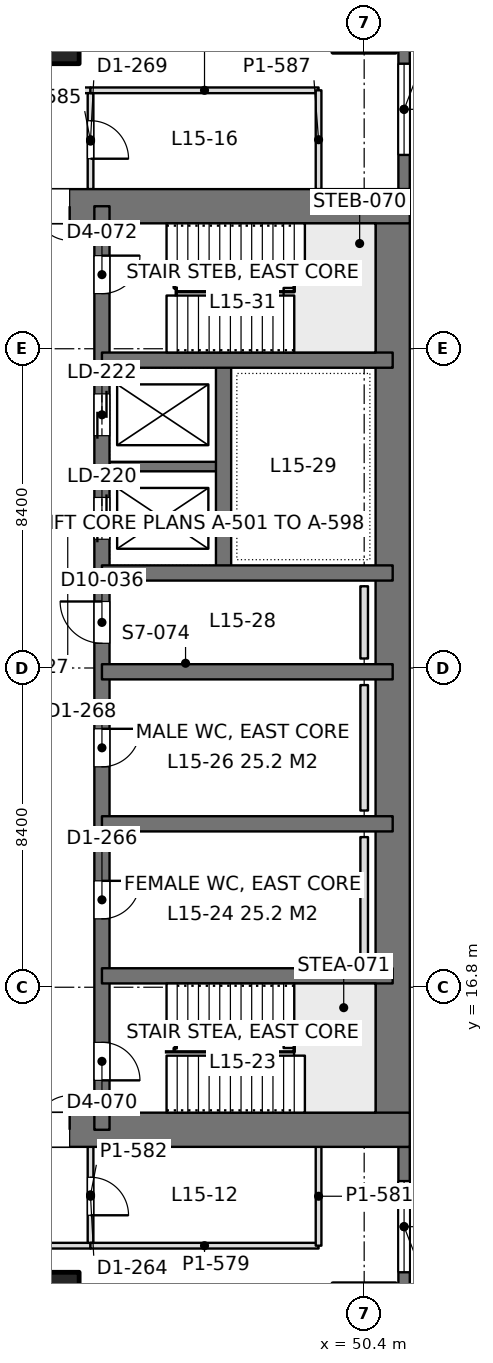
"""IFC4 building model, lengths in metres.
Left out: names, types, materials, properties, quantities, classifications, styles, units other than length and angle.
Written with IfcOpenShell. Run it as: python <this file> out.ifc"""

import sys

from ifc_helpers import new_model, si_unit, direction, frame, frame_2d, origin, origin_2d, place, context, subcontext, project, spatial, rectangle, extrude, element, fill, save


model = new_model("IFC4")
c1 = context("Model", 3, precision=1e-05, world=origin(), true_north=direction((0.0, 1.0)))
c2 = subcontext(c1, "Body", "Model", "MODEL_VIEW")
j1 = project(units=[si_unit("LENGTHUNIT", "METRE"), si_unit("PLANEANGLEUNIT", "RADIAN")], contexts=[c1])
p1 = place(None, origin())
s1 = spatial("IfcSite", under=j1, at=p1, CompositionType="ELEMENT")
p2 = place(p1, origin())
s2 = spatial("IfcBuilding", under=s1, at=p2, CompositionType="ELEMENT")
p3 = place(p2, frame((0.0, 0.0, 68.4)))
s3 = spatial("IfcBuildingStorey", under=s2, at=p3, CompositionType="ELEMENT", Elevation=68.4)
for number, where, z_axis, x_axis in (
    (1, (42.0, 8.4, 0.0), (0.0, 0.0, 1.0), (1.0, 0.0, 0.0)),
    (2, (42.0, 42.0, 0.0), (0.0, 0.0, 1.0), (1.0, 0.0, 0.0)),
):
    element("IfcColumn", number, at=place(p3, frame(where, z_axis=z_axis, x_axis=x_axis)), inside=s3, PredefinedType="COLUMN", context=c2, shape_type="SweptSolid", body=[
        extrude(rectangle(XDim=1.8, YDim=1.8, at=origin_2d()), origin(), (0.0, 0.0, 1.0), 4.5),
    ])
p4 = place(p3, frame((33.6, 13.05, 0.0), z_axis=(0.0, 0.0, 1.0), x_axis=(1.0, 0.0, 0.0)))
e3 = element("IfcWall", 3, at=p4, inside=s3, PredefinedType="SHEAR", context=c2, shape_type="SweptSolid", body=[
    extrude(rectangle(XDim=18.0, YDim=0.9, at=frame_2d((9.0, 0.0))), origin(), (0.0, 0.0, 1.0), 4.5),
])
p5 = place(p4, frame((7.25, 0.0, 0.0)))
e4 = element("IfcOpeningElement", 4, at=p5, cuts=e3, PredefinedType="OPENING", context=c2, shape_type="SweptSolid", body=[
    extrude(rectangle(XDim=1.8, YDim=2.4, at=frame_2d((0.9, 1.2))), frame((0.0, 0.46, 0.0), z_axis=(0.0, -1.0, 0.0), x_axis=(1.0, 0.0, 0.0)), (0.0, 0.0, 1.0), 0.92),
])
p6 = place(p3, frame((33.6, 37.35, 0.0), z_axis=(0.0, 0.0, 1.0), x_axis=(1.0, 0.0, 0.0)))
e5 = element("IfcWall", 5, at=p6, inside=s3, PredefinedType="SHEAR", context=c2, shape_type="SweptSolid", body=[
    extrude(rectangle(XDim=18.0, YDim=0.9, at=frame_2d((9.0, 0.0))), origin(), (0.0, 0.0, 1.0), 4.5),
])
p7 = place(p6, frame((7.25, 0.0, 0.0)))
e6 = element("IfcOpeningElement", 6, at=p7, cuts=e5, PredefinedType="OPENING", context=c2, shape_type="SweptSolid", body=[
    extrude(rectangle(XDim=1.8, YDim=2.4, at=frame_2d((0.9, 1.2))), frame((0.0, 0.46, 0.0), z_axis=(0.0, -1.0, 0.0), x_axis=(1.0, 0.0, 0.0)), (0.0, 0.0, 1.0), 0.92),
])
p8 = place(p3, frame((51.15, 13.05, 0.0), z_axis=(0.0, 0.0, 1.0), x_axis=(0.0, 1.0, 0.0)))
e7 = element("IfcWall", 7, at=p8, inside=s3, PredefinedType="SHEAR", context=c2, shape_type="SweptSolid", body=[
    extrude(rectangle(XDim=24.3, YDim=0.9, at=frame_2d((12.15, 0.0))), origin(), (0.0, 0.0, 1.0), 4.5),
])
p9 = place(p3, frame((43.5, 13.05, 0.0), z_axis=(0.0, 0.0, 1.0), x_axis=(0.0, 1.0, 0.0)))
e8 = element("IfcWall", 8, at=p9, inside=s3, PredefinedType="SHEAR", context=c2, shape_type="SweptSolid", body=[
    extrude(rectangle(XDim=24.3, YDim=0.4, at=frame_2d((12.15, 0.0))), origin(), (0.0, 0.0, 1.0), 4.5),
])
p10 = place(p9, frame((1.3, 0.0, 0.0)))
e9 = element("IfcOpeningElement", 9, at=p10, cuts=e8, PredefinedType="OPENING", context=c2, shape_type="SweptSolid", body=[
    extrude(rectangle(XDim=1.0, YDim=2.2, at=frame_2d((0.5, 1.1))), frame((0.0, 0.21, 0.0), z_axis=(0.0, -1.0, 0.0), x_axis=(1.0, 0.0, 0.0)), (0.0, 0.0, 1.0), 0.42),
])
p11 = place(p9, frame((22.0, 0.0, 0.0)))
e10 = element("IfcOpeningElement", 10, at=p11, cuts=e8, PredefinedType="OPENING", context=c2, shape_type="SweptSolid", body=[
    extrude(rectangle(XDim=1.0, YDim=2.2, at=frame_2d((0.5, 1.1))), frame((0.0, 0.21, 0.0), z_axis=(0.0, -1.0, 0.0), x_axis=(1.0, 0.0, 0.0)), (0.0, 0.0, 1.0), 0.42),
])
p12 = place(p9, frame((5.55, 0.0, 0.0)))
e11 = element("IfcOpeningElement", 11, at=p12, cuts=e8, PredefinedType="OPENING", context=c2, shape_type="SweptSolid", body=[
    extrude(rectangle(XDim=1.0, YDim=2.2, at=frame_2d((0.5, 1.1))), frame((0.0, 0.21, 0.0), z_axis=(0.0, -1.0, 0.0), x_axis=(1.0, 0.0, 0.0)), (0.0, 0.0, 1.0), 0.42),
])
p13 = place(p9, frame((9.55, 0.0, 0.0)))
e12 = element("IfcOpeningElement", 12, at=p13, cuts=e8, PredefinedType="OPENING", context=c2, shape_type="SweptSolid", body=[
    extrude(rectangle(XDim=1.0, YDim=2.2, at=frame_2d((0.5, 1.1))), frame((0.0, 0.21, 0.0), z_axis=(0.0, -1.0, 0.0), x_axis=(1.0, 0.0, 0.0)), (0.0, 0.0, 1.0), 0.42),
])
p14 = place(p9, frame((12.8, 0.0, 0.0)))
e13 = element("IfcOpeningElement", 13, at=p14, cuts=e8, PredefinedType="OPENING", context=c2, shape_type="SweptSolid", body=[
    extrude(rectangle(XDim=1.1, YDim=2.2, at=frame_2d((0.55, 1.1))), frame((0.0, 0.21, 0.0), z_axis=(0.0, -1.0, 0.0), x_axis=(1.0, 0.0, 0.0)), (0.0, 0.0, 1.0), 0.42),
])
p15 = place(p9, frame((15.538, 0.0, 0.0)))
e14 = element("IfcOpeningElement", 14, at=p15, cuts=e8, PredefinedType="OPENING", context=c2, shape_type="SweptSolid", body=[
    extrude(rectangle(XDim=1.1, YDim=2.2, at=frame_2d((0.55, 1.1))), frame((0.0, 0.21, 0.0), z_axis=(0.0, -1.0, 0.0), x_axis=(1.0, 0.0, 0.0)), (0.0, 0.0, 1.0), 0.42),
])
p16 = place(p9, frame((18.262, 0.0, 0.0)))
e15 = element("IfcOpeningElement", 15, at=p16, cuts=e8, PredefinedType="OPENING", context=c2, shape_type="SweptSolid", body=[
    extrude(rectangle(XDim=1.1, YDim=2.2, at=frame_2d((0.55, 1.1))), frame((0.0, 0.21, 0.0), z_axis=(0.0, -1.0, 0.0), x_axis=(1.0, 0.0, 0.0)), (0.0, 0.0, 1.0), 0.42),
])
for number, where, z_axis, x_axis in (
    (16, (51.15, 17.1, 0.0), (0.0, 0.0, 1.0), (-1.0, 0.0, 0.0)),
    (17, (51.15, 21.1, 0.0), (0.0, 0.0, 1.0), (-1.0, 0.0, 0.0)),
    (18, (51.15, 25.1, 0.0), (0.0, 0.0, 1.0), (-1.0, 0.0, 0.0)),
    (19, (51.15, 27.7, 0.0), (0.0, 0.0, 1.0), (-1.0, 0.0, 0.0)),
    (20, (51.15, 33.3, 0.0), (0.0, 0.0, 1.0), (-1.0, 0.0, 0.0)),
):
    element("IfcWall", number, at=place(p3, frame(where, z_axis=z_axis, x_axis=x_axis)), inside=s3, PredefinedType="SHEAR", context=c2, shape_type="SweptSolid", body=[
        extrude(rectangle(XDim=7.65, YDim=0.4, at=frame_2d((3.825, 0.0))), origin(), (0.0, 0.0, 1.0), 4.5),
    ])
p17 = place(p3, frame((46.7, 27.7, 0.0), z_axis=(0.0, 0.0, 1.0), x_axis=(0.0, 1.0, 0.0)))
e21 = element("IfcWall", 21, at=p17, inside=s3, PredefinedType="SHEAR", context=c2, shape_type="SweptSolid", body=[
    extrude(rectangle(XDim=5.6, YDim=0.4, at=frame_2d((2.8, 0.0))), origin(), (0.0, 0.0, 1.0), 4.5),
])
p18 = place(p3, frame((46.7, 30.5, 0.0), z_axis=(0.0, 0.0, 1.0), x_axis=(-1.0, 0.0, 0.0)))
e22 = element("IfcWall", 22, at=p18, inside=s3, PredefinedType="SHEAR", context=c2, shape_type="SweptSolid", body=[
    extrude(rectangle(XDim=3.2, YDim=0.25, at=frame_2d((1.6, 0.0))), origin(), (0.0, 0.0, 1.0), 4.5),
])
p19 = place(p3, frame((51.45, 42.0, 0.0), z_axis=(0.0, 0.0, 1.0), x_axis=(0.0, -1.0, 0.0)))
e23 = element("IfcWall", 23, at=p19, inside=s3, PredefinedType="SOLIDWALL", context=c2, shape_type="SweptSolid", body=[
    extrude(rectangle(XDim=4.2, YDim=0.3, at=frame_2d((2.1, 0.0))), origin(), (0.0, 0.0, 1.0), 4.34),
])
p20 = place(p19, frame((0.9, 0.0, 0.9)))
e24 = element("IfcOpeningElement", 24, at=p20, cuts=e23, PredefinedType="OPENING", context=c2, shape_type="SweptSolid", body=[
    extrude(rectangle(XDim=2.4, YDim=1.9, at=frame_2d((1.2, 0.95))), frame((0.0, 0.16, 0.0), z_axis=(0.0, -1.0, 0.0), x_axis=(1.0, 0.0, 0.0)), (0.0, 0.0, 1.0), 0.32),
])
p21 = place(p3, frame((51.45, 12.6, 0.0), z_axis=(0.0, 0.0, 1.0), x_axis=(0.0, -1.0, 0.0)))
e25 = element("IfcWall", 25, at=p21, inside=s3, PredefinedType="SOLIDWALL", context=c2, shape_type="SweptSolid", body=[
    extrude(rectangle(XDim=4.2, YDim=0.3, at=frame_2d((2.1, 0.0))), origin(), (0.0, 0.0, 1.0), 4.34),
])
p22 = place(p21, frame((0.9, 0.0, 0.9)))
e26 = element("IfcOpeningElement", 26, at=p22, cuts=e25, PredefinedType="OPENING", context=c2, shape_type="SweptSolid", body=[
    extrude(rectangle(XDim=2.4, YDim=1.9, at=frame_2d((1.2, 0.95))), frame((0.0, 0.16, 0.0), z_axis=(0.0, -1.0, 0.0), x_axis=(1.0, 0.0, 0.0)), (0.0, 0.0, 1.0), 0.32),
])
p23 = place(p3, frame((1.2, 10.0, 0.0), z_axis=(0.0, 0.0, 1.0), x_axis=(1.0, 0.0, 0.0)))
e27 = element("IfcWall", 27, at=p23, inside=s3, PredefinedType="PARTITIONING", context=c2, shape_type="SweptSolid", body=[
    extrude(rectangle(XDim=42.002, YDim=0.15, at=frame_2d((21.001, 0.0))), origin(), (0.0, 0.0, 1.0), 3.74),
])
p24 = place(p23, frame((2.1, 0.0, 0.0)))
e28 = element("IfcOpeningElement", 28, at=p24, cuts=e27, PredefinedType="OPENING", context=c2, shape_type="SweptSolid", body=[
    extrude(rectangle(XDim=1.8, YDim=2.2, at=frame_2d((0.9, 1.1))), frame((0.0, 0.085, 0.0), z_axis=(0.0, -1.0, 0.0), x_axis=(1.0, 0.0, 0.0)), (0.0, 0.0, 1.0), 0.17),
])
p25 = place(p23, frame((10.5, 0.0, 0.0)))
e29 = element("IfcOpeningElement", 29, at=p25, cuts=e27, PredefinedType="OPENING", context=c2, shape_type="SweptSolid", body=[
    extrude(rectangle(XDim=1.8, YDim=2.2, at=frame_2d((0.9, 1.1))), frame((0.0, 0.085, 0.0), z_axis=(0.0, -1.0, 0.0), x_axis=(1.0, 0.0, 0.0)), (0.0, 0.0, 1.0), 0.17),
])
p26 = place(p23, frame((18.9, 0.0, 0.0)))
e30 = element("IfcOpeningElement", 30, at=p26, cuts=e27, PredefinedType="OPENING", context=c2, shape_type="SweptSolid", body=[
    extrude(rectangle(XDim=1.8, YDim=2.2, at=frame_2d((0.9, 1.1))), frame((0.0, 0.085, 0.0), z_axis=(0.0, -1.0, 0.0), x_axis=(1.0, 0.0, 0.0)), (0.0, 0.0, 1.0), 0.17),
])
p27 = place(p23, frame((27.3, 0.0, 0.0)))
e31 = element("IfcOpeningElement", 31, at=p27, cuts=e27, PredefinedType="OPENING", context=c2, shape_type="SweptSolid", body=[
    extrude(rectangle(XDim=1.8, YDim=2.2, at=frame_2d((0.9, 1.1))), frame((0.0, 0.085, 0.0), z_axis=(0.0, -1.0, 0.0), x_axis=(1.0, 0.0, 0.0)), (0.0, 0.0, 1.0), 0.17),
])
p28 = place(p23, frame((35.7, 0.0, 0.0)))
e32 = element("IfcOpeningElement", 32, at=p28, cuts=e27, PredefinedType="OPENING", context=c2, shape_type="SweptSolid", body=[
    extrude(rectangle(XDim=1.8, YDim=2.2, at=frame_2d((0.9, 1.1))), frame((0.0, 0.085, 0.0), z_axis=(0.0, -1.0, 0.0), x_axis=(1.0, 0.0, 0.0)), (0.0, 0.0, 1.0), 0.17),
])
p29 = place(p3, frame((43.2, 10.074, 0.0), z_axis=(0.0, 0.0, 1.0), x_axis=(0.0, 1.0, 0.0)))
e33 = element("IfcWall", 33, at=p29, inside=s3, PredefinedType="PARTITIONING", context=c2, shape_type="SweptSolid", body=[
    extrude(rectangle(XDim=2.528, YDim=0.15, at=frame_2d((1.264, 0.0))), origin(), (0.0, 0.0, 1.0), 4.34),
])
p30 = place(p29, frame((0.726, 0.0, 0.0)))
e34 = element("IfcOpeningElement", 34, at=p30, cuts=e33, PredefinedType="OPENING", context=c2, shape_type="SweptSolid", body=[
    extrude(rectangle(XDim=1.0, YDim=2.2, at=frame_2d((0.5, 1.1))), frame((0.0, 0.085, 0.0), z_axis=(0.0, -1.0, 0.0), x_axis=(1.0, 0.0, 0.0)), (0.0, 0.0, 1.0), 0.17),
])
p31 = place(p3, frame((43.198, 10.0, 0.0), z_axis=(0.0, 0.0, 1.0), x_axis=(1.0, 0.0, 0.0)))
e35 = element("IfcWall", 35, at=p31, inside=s3, PredefinedType="PARTITIONING", context=c2, shape_type="SweptSolid", body=[
    extrude(rectangle(XDim=6.002, YDim=0.15, at=frame_2d((3.001, 0.0))), origin(), (0.0, 0.0, 1.0), 4.34),
])
p32 = place(p3, frame((49.2, 10.0, 0.0), z_axis=(0.0, 0.0, 1.0), x_axis=(0.0, 1.0, 0.0)))
e36 = element("IfcWall", 36, at=p32, inside=s3, PredefinedType="PARTITIONING", context=c2, shape_type="SweptSolid", body=[
    extrude(rectangle(XDim=2.602, YDim=0.15, at=frame_2d((1.301, 0.0))), origin(), (0.0, 0.0, 1.0), 4.34),
])
p33 = place(p3, frame((1.2, 40.4, 0.0), z_axis=(0.0, 0.0, 1.0), x_axis=(1.0, 0.0, 0.0)))
e37 = element("IfcWall", 37, at=p33, inside=s3, PredefinedType="PARTITIONING", context=c2, shape_type="SweptSolid", body=[
    extrude(rectangle(XDim=42.002, YDim=0.15, at=frame_2d((21.001, 0.0))), origin(), (0.0, 0.0, 1.0), 3.74),
])
p34 = place(p33, frame((2.1, 0.0, 0.0)))
e38 = element("IfcOpeningElement", 38, at=p34, cuts=e37, PredefinedType="OPENING", context=c2, shape_type="SweptSolid", body=[
    extrude(rectangle(XDim=1.8, YDim=2.2, at=frame_2d((0.9, 1.1))), frame((0.0, 0.085, 0.0), z_axis=(0.0, -1.0, 0.0), x_axis=(1.0, 0.0, 0.0)), (0.0, 0.0, 1.0), 0.17),
])
p35 = place(p33, frame((10.5, 0.0, 0.0)))
e39 = element("IfcOpeningElement", 39, at=p35, cuts=e37, PredefinedType="OPENING", context=c2, shape_type="SweptSolid", body=[
    extrude(rectangle(XDim=1.8, YDim=2.2, at=frame_2d((0.9, 1.1))), frame((0.0, 0.085, 0.0), z_axis=(0.0, -1.0, 0.0), x_axis=(1.0, 0.0, 0.0)), (0.0, 0.0, 1.0), 0.17),
])
p36 = place(p33, frame((18.9, 0.0, 0.0)))
e40 = element("IfcOpeningElement", 40, at=p36, cuts=e37, PredefinedType="OPENING", context=c2, shape_type="SweptSolid", body=[
    extrude(rectangle(XDim=1.8, YDim=2.2, at=frame_2d((0.9, 1.1))), frame((0.0, 0.085, 0.0), z_axis=(0.0, -1.0, 0.0), x_axis=(1.0, 0.0, 0.0)), (0.0, 0.0, 1.0), 0.17),
])
p37 = place(p33, frame((27.3, 0.0, 0.0)))
e41 = element("IfcOpeningElement", 41, at=p37, cuts=e37, PredefinedType="OPENING", context=c2, shape_type="SweptSolid", body=[
    extrude(rectangle(XDim=1.8, YDim=2.2, at=frame_2d((0.9, 1.1))), frame((0.0, 0.085, 0.0), z_axis=(0.0, -1.0, 0.0), x_axis=(1.0, 0.0, 0.0)), (0.0, 0.0, 1.0), 0.17),
])
p38 = place(p33, frame((35.7, 0.0, 0.0)))
e42 = element("IfcOpeningElement", 42, at=p38, cuts=e37, PredefinedType="OPENING", context=c2, shape_type="SweptSolid", body=[
    extrude(rectangle(XDim=1.8, YDim=2.2, at=frame_2d((0.9, 1.1))), frame((0.0, 0.085, 0.0), z_axis=(0.0, -1.0, 0.0), x_axis=(1.0, 0.0, 0.0)), (0.0, 0.0, 1.0), 0.17),
])
p39 = place(p3, frame((43.2, 37.8, 0.0), z_axis=(0.0, 0.0, 1.0), x_axis=(0.0, 1.0, 0.0)))
e43 = element("IfcWall", 43, at=p39, inside=s3, PredefinedType="PARTITIONING", context=c2, shape_type="SweptSolid", body=[
    extrude(rectangle(XDim=2.526, YDim=0.15, at=frame_2d((1.263, 0.0))), origin(), (0.0, 0.0, 1.0), 4.34),
])
p40 = place(p39, frame((0.8, 0.0, 0.0)))
e44 = element("IfcOpeningElement", 44, at=p40, cuts=e43, PredefinedType="OPENING", context=c2, shape_type="SweptSolid", body=[
    extrude(rectangle(XDim=1.0, YDim=2.2, at=frame_2d((0.5, 1.1))), frame((0.0, 0.085, 0.0), z_axis=(0.0, -1.0, 0.0), x_axis=(1.0, 0.0, 0.0)), (0.0, 0.0, 1.0), 0.17),
])
p41 = place(p3, frame((43.198, 40.4, 0.0), z_axis=(0.0, 0.0, 1.0), x_axis=(1.0, 0.0, 0.0)))
e45 = element("IfcWall", 45, at=p41, inside=s3, PredefinedType="PARTITIONING", context=c2, shape_type="SweptSolid", body=[
    extrude(rectangle(XDim=6.002, YDim=0.15, at=frame_2d((3.001, 0.0))), origin(), (0.0, 0.0, 1.0), 3.98),
])
p42 = place(p3, frame((49.2, 37.8, 0.0), z_axis=(0.0, 0.0, 1.0), x_axis=(0.0, 1.0, 0.0)))
e46 = element("IfcWall", 46, at=p42, inside=s3, PredefinedType="PARTITIONING", context=c2, shape_type="SweptSolid", body=[
    extrude(rectangle(XDim=2.6, YDim=0.15, at=frame_2d((1.3, 0.0))), origin(), (0.0, 0.0, 1.0), 4.34),
])
for number, where, z_axis, x_axis in (
    (47, (50.4, 17.45, 0.0), (0.0, 0.0, 1.0), (0.0, 1.0, 0.0)),
    (48, (50.4, 21.45, 0.0), (0.0, 0.0, 1.0), (0.0, 1.0, 0.0)),
):
    element("IfcWall", number, at=place(p3, frame(where, z_axis=z_axis, x_axis=x_axis)), inside=s3, PredefinedType="PLUMBINGWALL", context=c2, shape_type="SweptSolid", body=[
        extrude(rectangle(XDim=3.3, YDim=0.2, at=frame_2d((1.65, 0.0))), origin(), (0.0, 0.0, 1.0), 1.2),
    ])
p43 = place(p3, frame((50.4, 25.45, 0.0), z_axis=(0.0, 0.0, 1.0), x_axis=(0.0, 1.0, 0.0)))
e49 = element("IfcWall", 49, at=p43, inside=s3, PredefinedType="PLUMBINGWALL", context=c2, shape_type="SweptSolid", body=[
    extrude(rectangle(XDim=1.9, YDim=0.2, at=frame_2d((0.95, 0.0))), origin(), (0.0, 0.0, 1.0), 1.2),
])
p44 = place(p20, origin())
e50 = element("IfcWindow", 50, at=p44, inside=s3, PartitioningType="SINGLE_PANEL", PredefinedType="WINDOW", context=c2, shape_type="SweptSolid", body=[
    extrude(rectangle(XDim=2.4, YDim=1.9, at=frame_2d((1.2, 0.95))), frame((0.0, 0.03, 0.0), z_axis=(0.0, -1.0, 0.0), x_axis=(1.0, 0.0, 0.0)), (0.0, 0.0, 1.0), 0.06),
])
fill(e24, e50)
p45 = place(p22, origin())
e51 = element("IfcWindow", 51, at=p45, inside=s3, PartitioningType="SINGLE_PANEL", PredefinedType="WINDOW", context=c2, shape_type="SweptSolid", body=[
    extrude(rectangle(XDim=2.4, YDim=1.9, at=frame_2d((1.2, 0.95))), frame((0.0, 0.03, 0.0), z_axis=(0.0, -1.0, 0.0), x_axis=(1.0, 0.0, 0.0)), (0.0, 0.0, 1.0), 0.06),
])
fill(e26, e51)
p46 = place(p5, origin())
e52 = element("IfcDoor", 52, at=p46, inside=s3, OperationType="DOUBLE_DOOR_SINGLE_SWING", PredefinedType="DOOR", context=c2, shape_type="SweptSolid", body=[
    extrude(rectangle(XDim=1.8, YDim=2.4, at=frame_2d((0.9, 1.2))), frame((0.0, 0.025, 0.0), z_axis=(0.0, -1.0, 0.0), x_axis=(1.0, 0.0, 0.0)), (0.0, 0.0, 1.0), 0.05),
])
fill(e4, e52)
p47 = place(p7, frame((1.8, 0.0, 0.0), z_axis=(0.0, 0.0, 1.0), x_axis=(-1.0, 0.0, 0.0)))
e53 = element("IfcDoor", 53, at=p47, inside=s3, OperationType="DOUBLE_DOOR_SINGLE_SWING", PredefinedType="DOOR", context=c2, shape_type="SweptSolid", body=[
    extrude(rectangle(XDim=1.8, YDim=2.4, at=frame_2d((0.9, 1.2))), frame((0.0, 0.025, 0.0), z_axis=(0.0, -1.0, 0.0), x_axis=(1.0, 0.0, 0.0)), (0.0, 0.0, 1.0), 0.05),
])
fill(e6, e53)
p48 = place(p10, frame((1.0, 0.0, 0.0), z_axis=(0.0, 0.0, 1.0), x_axis=(-1.0, 0.0, 0.0)))
e54 = element("IfcDoor", 54, at=p48, inside=s3, OperationType="SINGLE_SWING_RIGHT", PredefinedType="DOOR", context=c2, shape_type="SweptSolid", body=[
    extrude(rectangle(XDim=1.0, YDim=2.2, at=frame_2d((0.5, 1.1))), frame((0.0, 0.025, 0.0), z_axis=(0.0, -1.0, 0.0), x_axis=(1.0, 0.0, 0.0)), (0.0, 0.0, 1.0), 0.05),
])
fill(e9, e54)
p49 = place(p11, frame((1.0, 0.0, 0.0), z_axis=(0.0, 0.0, 1.0), x_axis=(-1.0, 0.0, 0.0)))
e55 = element("IfcDoor", 55, at=p49, inside=s3, OperationType="SINGLE_SWING_LEFT", PredefinedType="DOOR", context=c2, shape_type="SweptSolid", body=[
    extrude(rectangle(XDim=1.0, YDim=2.2, at=frame_2d((0.5, 1.1))), frame((0.0, 0.025, 0.0), z_axis=(0.0, -1.0, 0.0), x_axis=(1.0, 0.0, 0.0)), (0.0, 0.0, 1.0), 0.05),
])
fill(e10, e55)
p50 = place(p12, frame((1.0, 0.0, 0.0), z_axis=(0.0, 0.0, 1.0), x_axis=(-1.0, 0.0, 0.0)))
e56 = element("IfcDoor", 56, at=p50, inside=s3, OperationType="SINGLE_SWING_LEFT", PredefinedType="DOOR", context=c2, shape_type="SweptSolid", body=[
    extrude(rectangle(XDim=1.0, YDim=2.2, at=frame_2d((0.5, 1.1))), frame((0.0, 0.025, 0.0), z_axis=(0.0, -1.0, 0.0), x_axis=(1.0, 0.0, 0.0)), (0.0, 0.0, 1.0), 0.05),
])
fill(e11, e56)
p51 = place(p13, frame((1.0, 0.0, 0.0), z_axis=(0.0, 0.0, 1.0), x_axis=(-1.0, 0.0, 0.0)))
e57 = element("IfcDoor", 57, at=p51, inside=s3, OperationType="SINGLE_SWING_LEFT", PredefinedType="DOOR", context=c2, shape_type="SweptSolid", body=[
    extrude(rectangle(XDim=1.0, YDim=2.2, at=frame_2d((0.5, 1.1))), frame((0.0, 0.025, 0.0), z_axis=(0.0, -1.0, 0.0), x_axis=(1.0, 0.0, 0.0)), (0.0, 0.0, 1.0), 0.05),
])
fill(e12, e57)
p52 = place(p14, origin())
e58 = element("IfcDoor", 58, at=p52, inside=s3, OperationType="SINGLE_SWING_RIGHT", PredefinedType="DOOR", context=c2, shape_type="SweptSolid", body=[
    extrude(rectangle(XDim=1.1, YDim=2.2, at=frame_2d((0.55, 1.1))), frame((0.0, 0.025, 0.0), z_axis=(0.0, -1.0, 0.0), x_axis=(1.0, 0.0, 0.0)), (0.0, 0.0, 1.0), 0.05),
])
fill(e13, e58)
p53 = place(p15, origin())
e59 = element("IfcDoor", 59, at=p53, inside=s3, OperationType="DOUBLE_DOOR_SLIDING", PredefinedType="DOOR", context=c2, shape_type="SweptSolid", body=[
    extrude(rectangle(XDim=1.1, YDim=2.2, at=frame_2d((0.55, 1.1))), frame((0.0, 0.025, 0.0), z_axis=(0.0, -1.0, 0.0), x_axis=(1.0, 0.0, 0.0)), (0.0, 0.0, 1.0), 0.05),
])
fill(e14, e59)
p54 = place(p16, origin())
e60 = element("IfcDoor", 60, at=p54, inside=s3, OperationType="DOUBLE_DOOR_SLIDING", PredefinedType="DOOR", context=c2, shape_type="SweptSolid", body=[
    extrude(rectangle(XDim=1.1, YDim=2.2, at=frame_2d((0.55, 1.1))), frame((0.0, 0.025, 0.0), z_axis=(0.0, -1.0, 0.0), x_axis=(1.0, 0.0, 0.0)), (0.0, 0.0, 1.0), 0.05),
])
fill(e15, e60)
p55 = place(p30, frame((1.0, 0.0, 0.0), z_axis=(0.0, 0.0, 1.0), x_axis=(-1.0, 0.0, 0.0)))
e61 = element("IfcDoor", 61, at=p55, inside=s3, OperationType="SINGLE_SWING_RIGHT", PredefinedType="DOOR", context=c2, shape_type="SweptSolid", body=[
    extrude(rectangle(XDim=1.0, YDim=2.2, at=frame_2d((0.5, 1.1))), frame((0.0, 0.025, 0.0), z_axis=(0.0, -1.0, 0.0), x_axis=(1.0, 0.0, 0.0)), (0.0, 0.0, 1.0), 0.05),
])
fill(e34, e61)
p56 = place(p40, frame((1.0, 0.0, 0.0), z_axis=(0.0, 0.0, 1.0), x_axis=(-1.0, 0.0, 0.0)))
e62 = element("IfcDoor", 62, at=p56, inside=s3, OperationType="SINGLE_SWING_RIGHT", PredefinedType="DOOR", context=c2, shape_type="SweptSolid", body=[
    extrude(rectangle(XDim=1.0, YDim=2.2, at=frame_2d((0.5, 1.1))), frame((0.0, 0.025, 0.0), z_axis=(0.0, -1.0, 0.0), x_axis=(1.0, 0.0, 0.0)), (0.0, 0.0, 1.0), 0.05),
])
fill(e44, e62)
save(model, sys.argv[1])
